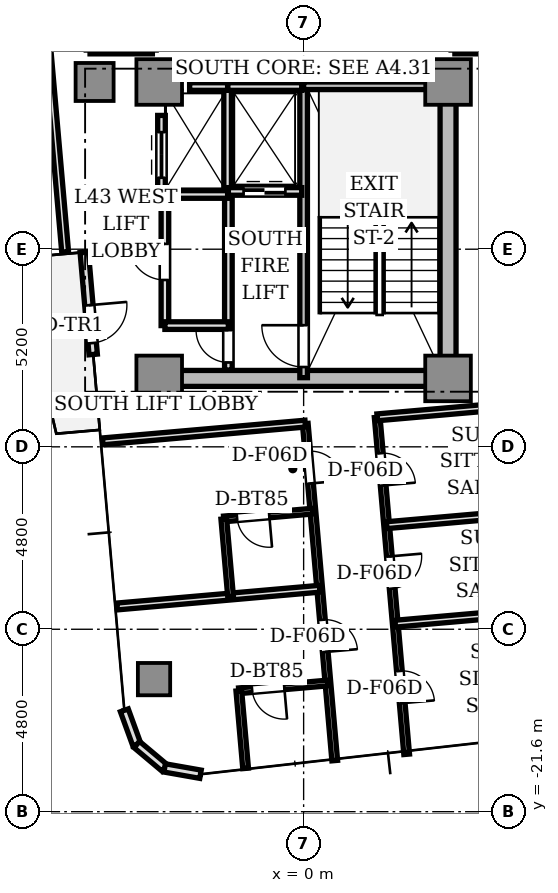
"""IFC4 building model, lengths in metres.
Left out: names, types, materials, properties, quantities, classifications, styles, units other than length and angle.
Written with IfcOpenShell. Run it as: python <this file> out.ifc"""

import sys

from ifc_helpers import new_model, si_unit, direction, frame, frame_2d, origin, origin_2d, place, context, subcontext, project, spatial, rectangle, extrude, source, transform, mapped, element, fill, save


model = new_model("IFC4")
c1 = context("Model", 3, precision=1e-05, world=origin(), true_north=direction((0.0, 1.0)))
c2 = subcontext(c1, "Body", "Model", "MODEL_VIEW")
j1 = project(units=[si_unit("LENGTHUNIT", "METRE"), si_unit("PLANEANGLEUNIT", "RADIAN")], contexts=[c1])
p1 = place(None, origin())
s1 = spatial("IfcSite", under=j1, at=p1, CompositionType="ELEMENT")
p2 = place(p1, origin())
s2 = spatial("IfcBuilding", under=s1, at=p2, CompositionType="ELEMENT")
p3 = place(p2, frame((0.0, 0.0, 157.3)))
s3 = spatial("IfcBuildingStorey", under=s2, at=p3, CompositionType="ELEMENT", Elevation=157.3)
p4 = place(p3, frame((-3.55, -10.2, 0.0), z_axis=(0.0, 0.0, 1.0), x_axis=(1.0, 0.0, 0.0)))
e1 = element("IfcWall", 1, at=p4, inside=s3, PredefinedType="SHEAR", context=c2, shape_type="SweptSolid", body=[
    extrude(rectangle(XDim=7.1, YDim=0.42, at=frame_2d((3.55, 0.0))), origin(), (0.0, 0.0, 1.0), 3.11),
])
p5 = place(p3, frame((3.8, -9.75, 0.0), z_axis=(0.0, 0.0, 1.0), x_axis=(0.0, 1.0, 0.0)))
e2 = element("IfcWall", 2, at=p5, inside=s3, PredefinedType="SHEAR", context=c2, shape_type="SweptSolid", body=[
    extrude(rectangle(XDim=6.9, YDim=0.42, at=frame_2d((3.45, 0.0))), origin(), (0.0, 0.0, 1.0), 3.11),
])
m1 = source(origin(), c2, "Body", "SweptSolid", [
    extrude(rectangle(XDim=1.2, YDim=1.2, at=origin_2d()), origin(), (0.0, 0.0, 1.0), 3.11),
])
for number, where, z_axis, x_axis in (
    (3, (-3.8, -2.4, 0.0), (0.0, 0.0, 1.0), (1.0, 0.0, 0.0)),
    (4, (3.8, -2.4, 0.0), (0.0, 0.0, 1.0), (1.0, 0.0, 0.0)),
    (5, (-3.8, -10.2, 0.0), (0.0, 0.0, 1.0), (1.0, 0.0, 0.0)),
    (6, (3.8, -10.2, 0.0), (0.0, 0.0, 1.0), (1.0, 0.0, 0.0)),
):
    element("IfcColumn", number, at=place(p3, frame(where, z_axis=z_axis, x_axis=x_axis)), inside=s3, PredefinedType="COLUMN", context=c2, shape_type="MappedRepresentation", body=[
        mapped(m1, transform((0.0, 0.0, 0.0), scale=1.0)),
    ])
m2 = source(origin(), c2, "Body", "SweptSolid", [
    extrude(rectangle(XDim=1.0, YDim=1.0, at=origin_2d()), origin(), (0.0, 0.0, 1.0), 3.11),
])
p6 = place(p3, frame((-5.5, -2.4, 0.0), z_axis=(0.0, 0.0, 1.0), x_axis=(1.0, 0.0, 0.0)))
e7 = element("IfcColumn", 7, at=p6, inside=s3, PredefinedType="COLUMN", context=c2, shape_type="MappedRepresentation", body=[
    mapped(m2, transform((0.0, 0.0, 0.0), scale=1.0)),
])
m3 = source(origin(), c2, "Body", "SweptSolid", [
    extrude(rectangle(XDim=0.85, YDim=0.85, at=origin_2d()), origin(), (0.0, 0.0, 1.0), 3.11),
])
p7 = place(p3, frame((-3.936, -18.112, 0.0), z_axis=(0.0, 0.0, 1.0), x_axis=(1.0, 0.0, 0.0)))
e8 = element("IfcColumn", 8, at=p7, inside=s3, PredefinedType="COLUMN", context=c2, shape_type="MappedRepresentation", body=[
    mapped(m3, transform((0.0, 0.0, 0.0), scale=1.0)),
])
p8 = place(p3, frame((-5.772, -6.879, 0.0), z_axis=(0.0, 0.0, 1.0), x_axis=(0.087168071984, -0.996193619346, 0.0)))
e9 = element("IfcWall", 9, at=p8, inside=s3, PredefinedType="STANDARD", context=c2, shape_type="SweptSolid", body=[
    extrude(rectangle(XDim=2.7, YDim=0.22, at=frame_2d((1.35, 0.0))), origin(), (0.0, 0.0, 1.0), 3.11),
])
p9 = place(p8, frame((1.4, 0.0, 0.0)))
e10 = element("IfcOpeningElement", 10, at=p9, cuts=e9, PredefinedType="OPENING", context=c2, shape_type="SweptSolid", body=[
    extrude(rectangle(XDim=1.0, YDim=2.2, at=frame_2d((0.5, 1.1))), frame((0.0, 0.12, 0.0), z_axis=(0.0, -1.0, 0.0), x_axis=(1.0, 0.0, 0.0)), (0.0, 0.0, 1.0), 0.24),
])
p10 = place(p3, frame((-4.718, -18.933, 0.0), z_axis=(0.0, 0.0, 1.0), x_axis=(0.34188635151, -0.939741306239, 0.0)))
e11 = element("IfcWall", 11, at=p10, inside=s3, PredefinedType="STANDARD", context=c2, shape_type="SweptSolid", body=[
    extrude(rectangle(XDim=0.958, YDim=0.22, at=frame_2d((0.479, 0.0))), origin(), (0.0, 0.0, 1.0), 3.11),
])
for number, where, z_axis, x_axis in (
    (12, (-4.39, -19.833, 0.0), (0.0, 0.0, 1.0), (0.766, -0.643, 0.0)),
    (13, (-3.657, -20.449, 0.0), (0.0, 0.0, 1.0), (0.985, -0.174, 0.0)),
):
    element("IfcWall", number, at=place(p3, frame(where, z_axis=z_axis, x_axis=x_axis)), inside=s3, PredefinedType="STANDARD", context=c2, shape_type="SweptSolid", body=[
        extrude(rectangle(XDim=0.958, YDim=0.22, at=frame_2d((0.479, 0.0))), origin(), (0.0, 0.0, 1.0), 3.11),
    ])
p11 = place(p3, frame((0.0, -10.18, 0.0), z_axis=(0.0, 0.0, 1.0), x_axis=(0.0, 1.0, 0.0)))
e14 = element("IfcWall", 14, at=p11, inside=s3, PredefinedType="SOLIDWALL", context=c2, shape_type="SweptSolid", body=[
    extrude(rectangle(XDim=7.68, YDim=0.2, at=frame_2d((3.84, 0.0))), origin(), (0.0, 0.0, 1.0), 3.11),
])
p12 = place(p11, frame((0.28, 0.0, 0.0)))
e15 = element("IfcOpeningElement", 15, at=p12, cuts=e14, PredefinedType="OPENING", context=c2, shape_type="SweptSolid", body=[
    extrude(rectangle(XDim=1.1, YDim=2.15, at=frame_2d((0.55, 1.075))), frame((0.0, 0.11, 0.0), z_axis=(0.0, -1.0, 0.0), x_axis=(1.0, 0.0, 0.0)), (0.0, 0.0, 1.0), 0.22),
])
p13 = place(p3, frame((0.0, -2.5, 0.0), z_axis=(0.0, 0.0, 1.0), x_axis=(1.0, 0.0, 0.0)))
e16 = element("IfcWall", 16, at=p13, inside=s3, PredefinedType="SOLIDWALL", context=c2, shape_type="SweptSolid", body=[
    extrude(rectangle(XDim=3.72, YDim=0.2, at=frame_2d((1.86, 0.0))), origin(), (0.0, 0.0, 1.0), 3.11),
])
p14 = place(p3, frame((-1.98, -9.98, 0.0), z_axis=(0.0, 0.0, 1.0), x_axis=(0.0, 1.0, 0.0)))
e17 = element("IfcWall", 17, at=p14, inside=s3, PredefinedType="SOLIDWALL", context=c2, shape_type="SweptSolid", body=[
    extrude(rectangle(XDim=4.66, YDim=0.2, at=frame_2d((2.33, 0.0))), origin(), (0.0, 0.0, 1.0), 2.66),
])
p15 = place(p14, frame((0.2, 0.0, 0.0)))
e18 = element("IfcOpeningElement", 18, at=p15, cuts=e17, PredefinedType="OPENING", context=c2, shape_type="SweptSolid", body=[
    extrude(rectangle(XDim=0.85, YDim=2.1, at=frame_2d((0.425, 1.05))), frame((0.0, 0.11, 0.0), z_axis=(0.0, -1.0, 0.0), x_axis=(1.0, 0.0, 0.0)), (0.0, 0.0, 1.0), 0.22),
])
p16 = place(p3, frame((-2.0, -5.28, 0.0), z_axis=(0.0, 0.0, 1.0), x_axis=(0.0, 1.0, 0.0)))
e19 = element("IfcWall", 19, at=p16, inside=s3, PredefinedType="SOLIDWALL", context=c2, shape_type="SweptSolid", body=[
    extrude(rectangle(XDim=2.78, YDim=0.2, at=frame_2d((1.39, 0.0))), origin(), (0.0, 0.0, 1.0), 2.66),
])
p17 = place(p3, frame((-2.0, -2.52, 0.0), z_axis=(0.0, 0.0, 1.0), x_axis=(1.0, 0.0, 0.0)))
e20 = element("IfcWall", 20, at=p17, inside=s3, PredefinedType="SOLIDWALL", context=c2, shape_type="SweptSolid", body=[
    extrude(rectangle(XDim=1.95, YDim=0.2, at=frame_2d((0.975, 0.0))), origin(), (0.0, 0.0, 1.0), 2.66),
])
p18 = place(p3, frame((-1.98, -5.28, 0.0), z_axis=(0.0, 0.0, 1.0), x_axis=(1.0, 0.0, 0.0)))
e21 = element("IfcWall", 21, at=p18, inside=s3, PredefinedType="SOLIDWALL", context=c2, shape_type="SweptSolid", body=[
    extrude(rectangle(XDim=1.93, YDim=0.2, at=frame_2d((0.965, 0.0))), origin(), (0.0, 0.0, 1.0), 2.66),
])
p19 = place(p18, frame((0.4, 0.0, 0.0)))
e22 = element("IfcOpeningElement", 22, at=p19, cuts=e21, PredefinedType="OPENING", context=c2, shape_type="SweptSolid", body=[
    extrude(rectangle(XDim=1.1, YDim=2.2, at=frame_2d((0.55, 1.1))), frame((0.0, 0.11, 0.0), z_axis=(0.0, -1.0, 0.0), x_axis=(1.0, 0.0, 0.0)), (0.0, 0.0, 1.0), 0.22),
])
p20 = place(p3, frame((-3.0, -2.52, 0.0), z_axis=(0.0, 0.0, 1.0), x_axis=(1.0, 0.0, 0.0)))
e23 = element("IfcWall", 23, at=p20, inside=s3, PredefinedType="SOLIDWALL", context=c2, shape_type="SweptSolid", body=[
    extrude(rectangle(XDim=1.0, YDim=0.2, at=frame_2d((0.5, 0.0))), origin(), (0.0, 0.0, 1.0), 2.66),
])
p21 = place(p3, frame((-3.74, -5.36, 0.0), z_axis=(0.0, 0.0, 1.0), x_axis=(1.0, 0.0, 0.0)))
e24 = element("IfcWall", 24, at=p21, inside=s3, PredefinedType="SOLIDWALL", context=c2, shape_type="SweptSolid", body=[
    extrude(rectangle(XDim=1.74, YDim=0.2, at=frame_2d((0.87, 0.0))), origin(), (0.0, 0.0, 1.0), 2.66),
])
p22 = place(p3, frame((-3.74, -5.36, 0.0), z_axis=(0.0, 0.0, 1.0), x_axis=(0.0, 1.0, 0.0)))
e25 = element("IfcWall", 25, at=p22, inside=s3, PredefinedType="SOLIDWALL", context=c2, shape_type="SweptSolid", body=[
    extrude(rectangle(XDim=2.08, YDim=0.2, at=frame_2d((1.04, 0.0))), origin(), (0.0, 0.0, 1.0), 2.66),
])
p23 = place(p22, frame((0.44, 0.0, 0.0)))
e26 = element("IfcOpeningElement", 26, at=p23, cuts=e25, PredefinedType="OPENING", context=c2, shape_type="SweptSolid", body=[
    extrude(rectangle(XDim=1.2, YDim=2.2, at=frame_2d((0.6, 1.1))), frame((0.0, 0.11, 0.0), z_axis=(0.0, -1.0, 0.0), x_axis=(1.0, 0.0, 0.0)), (0.0, 0.0, 1.0), 0.22),
])
for number, where, z_axis, x_axis in (
    (27, (3.98, -1.56, 0.0), (0.0, 0.0, 1.0), (1.0, 0.0, 0.0)),
    (28, (-5.62, -1.56, 0.0), (0.0, 0.0, 1.0), (1.0, 0.0, 0.0)),
):
    element("IfcWall", number, at=place(p3, frame(where, z_axis=z_axis, x_axis=x_axis)), inside=s3, PredefinedType="SOLIDWALL", context=c2, shape_type="SweptSolid", body=[
        extrude(rectangle(XDim=1.64, YDim=0.2, at=frame_2d((0.82, 0.0))), origin(), (0.0, 0.0, 1.0), 2.66),
    ])
p24 = place(p3, frame((-3.65, -8.81, 0.0), z_axis=(0.0, 0.0, 1.0), x_axis=(0.0, 1.0, 0.0)))
e29 = element("IfcWall", 29, at=p24, inside=s3, PredefinedType="SOLIDWALL", context=c2, shape_type="SweptSolid", body=[
    extrude(rectangle(XDim=3.43, YDim=0.2, at=frame_2d((1.715, 0.0))), origin(), (0.0, 0.0, 1.0), 2.66),
])
p25 = place(p24, frame((1.2, 0.0, 0.0)))
e30 = element("IfcOpeningElement", 30, at=p25, cuts=e29, PredefinedType="OPENING", context=c2, shape_type="SweptSolid", body=[
    extrude(rectangle(XDim=0.95, YDim=2.15, at=frame_2d((0.475, 1.075))), frame((0.0, 0.11, 0.0), z_axis=(0.0, -1.0, 0.0), x_axis=(1.0, 0.0, 0.0)), (0.0, 0.0, 1.0), 0.22),
])
p26 = place(p3, frame((-3.65, -8.81, 0.0), z_axis=(0.0, 0.0, 1.0), x_axis=(1.0, 0.0, 0.0)))
e31 = element("IfcWall", 31, at=p26, inside=s3, PredefinedType="SOLIDWALL", context=c2, shape_type="SweptSolid", body=[
    extrude(rectangle(XDim=1.67, YDim=0.2, at=frame_2d((0.835, 0.0))), origin(), (0.0, 0.0, 1.0), 2.66),
])
p27 = place(p3, frame((-6.741, -1.543, 0.0), z_axis=(0.0, 0.0, 1.0), x_axis=(0.087161289348, -0.996194212812, 0.0)))
e32 = element("IfcWall", 32, at=p27, inside=s3, PredefinedType="PARTITIONING", context=c2, shape_type="SweptSolid", body=[
    extrude(rectangle(XDim=5.35, YDim=0.18, at=frame_2d((2.675, 0.0))), origin(), (0.0, 0.0, 1.0), 2.66),
])
p28 = place(p3, frame((1.936, -11.224, 0.0), z_axis=(0.0, 0.0, 1.0), x_axis=(0.087151636982, -0.996195057291, 0.0)))
e33 = element("IfcWall", 33, at=p28, inside=s3, PredefinedType="PARTITIONING", context=c2, shape_type="SweptSolid", body=[
    extrude(rectangle(XDim=8.9, YDim=0.15, at=frame_2d((4.45, 0.0))), origin(), (0.0, 0.0, 1.0), 2.66),
])
p29 = place(p28, frame((0.949, 0.0, 0.0)))
e34 = element("IfcOpeningElement", 34, at=p29, cuts=e33, PredefinedType="OPENING", context=c2, shape_type="SweptSolid", body=[
    extrude(rectangle(XDim=0.85, YDim=2.1, at=frame_2d((0.425, 1.05))), frame((0.0, 0.085, 0.0), z_axis=(0.0, -1.0, 0.0), x_axis=(1.0, 0.0, 0.0)), (0.0, 0.0, 1.0), 0.17),
])
p30 = place(p28, frame((3.674, 0.0, 0.0)))
e35 = element("IfcOpeningElement", 35, at=p30, cuts=e33, PredefinedType="OPENING", context=c2, shape_type="SweptSolid", body=[
    extrude(rectangle(XDim=0.85, YDim=2.1, at=frame_2d((0.425, 1.05))), frame((0.0, 0.085, 0.0), z_axis=(0.0, -1.0, 0.0), x_axis=(1.0, 0.0, 0.0)), (0.0, 0.0, 1.0), 0.17),
])
p31 = place(p28, frame((6.7, 0.0, 0.0)))
e36 = element("IfcOpeningElement", 36, at=p31, cuts=e33, PredefinedType="OPENING", context=c2, shape_type="SweptSolid", body=[
    extrude(rectangle(XDim=0.85, YDim=2.1, at=frame_2d((0.425, 1.05))), frame((0.0, 0.085, 0.0), z_axis=(0.0, -1.0, 0.0), x_axis=(1.0, 0.0, 0.0)), (0.0, 0.0, 1.0), 0.17),
])
p32 = place(p3, frame((0.043, -11.39, 0.0), z_axis=(0.0, 0.0, 1.0), x_axis=(0.087178860582, -0.996192675273, 0.0)))
e37 = element("IfcWall", 37, at=p32, inside=s3, PredefinedType="PARTITIONING", context=c2, shape_type="SweptSolid", body=[
    extrude(rectangle(XDim=8.9, YDim=0.15, at=frame_2d((4.45, 0.0))), origin(), (0.0, 0.0, 1.0), 2.66),
])
p33 = place(p32, frame((0.73, 0.0, 0.0)))
e38 = element("IfcOpeningElement", 38, at=p33, cuts=e37, PredefinedType="OPENING", context=c2, shape_type="SweptSolid", body=[
    extrude(rectangle(XDim=0.85, YDim=2.1, at=frame_2d((0.425, 1.05))), frame((0.0, 0.085, 0.0), z_axis=(0.0, -1.0, 0.0), x_axis=(1.0, 0.0, 0.0)), (0.0, 0.0, 1.0), 0.17),
])
p34 = place(p32, frame((5.181, 0.0, 0.0)))
e39 = element("IfcOpeningElement", 39, at=p34, cuts=e37, PredefinedType="OPENING", context=c2, shape_type="SweptSolid", body=[
    extrude(rectangle(XDim=0.85, YDim=2.1, at=frame_2d((0.425, 1.05))), frame((0.0, 0.085, 0.0), z_axis=(0.0, -1.0, 0.0), x_axis=(1.0, 0.0, 0.0)), (0.0, 0.0, 1.0), 0.17),
])
for number, where, z_axis, x_axis in (
    (40, (1.936, -11.224, 0.0), (0.0, 0.0, 1.0), (0.996, 0.087, 0.0)),
    (41, (-5.287, -11.856, 0.0), (0.0, 0.0, 1.0), (0.996, 0.087, 0.0)),
    (42, (2.184, -14.061, 0.0), (0.0, 0.0, 1.0), (0.996, 0.087, 0.0)),
    (43, (2.411, -16.653, 0.0), (0.0, 0.0, 1.0), (0.996, 0.087, 0.0)),
    (44, (0.423, -15.734, 0.0), (0.0, 0.0, 1.0), (-0.996, -0.087, 0.0)),
):
    element("IfcWall", number, at=place(p3, frame(where, z_axis=z_axis, x_axis=x_axis)), inside=s3, PredefinedType="PARTITIONING", context=c2, shape_type="SweptSolid", body=[
        extrude(rectangle(XDim=5.35, YDim=0.18, at=frame_2d((2.675, 0.0))), origin(), (0.0, 0.0, 1.0), 2.66),
    ])
p35 = place(p3, frame((0.244, -13.692, 0.0), z_axis=(0.0, 0.0, 1.0), x_axis=(-0.996197656711, -0.087121918963, 0.0)))
e45 = element("IfcWall", 45, at=p35, inside=s3, PredefinedType="PARTITIONING", context=c2, shape_type="SweptSolid", body=[
    extrude(rectangle(XDim=2.354, YDim=0.15, at=frame_2d((1.177, 0.0))), origin(), (0.0, 0.0, 1.0), 2.66),
])
p36 = place(p35, frame((1.154, 0.0, 0.0)))
e46 = element("IfcOpeningElement", 46, at=p36, cuts=e45, PredefinedType="OPENING", context=c2, shape_type="SweptSolid", body=[
    extrude(rectangle(XDim=0.85, YDim=2.1, at=frame_2d((0.425, 1.05))), frame((0.0, 0.085, 0.0), z_axis=(0.0, -1.0, 0.0), x_axis=(1.0, 0.0, 0.0)), (0.0, 0.0, 1.0), 0.17),
])
p37 = place(p3, frame((-2.101, -13.897, 0.0), z_axis=(0.0, 0.0, 1.0), x_axis=(0.087174336889, -0.99619307114, 0.0)))
e47 = element("IfcWall", 47, at=p37, inside=s3, PredefinedType="PARTITIONING", context=c2, shape_type="SweptSolid", body=[
    extrude(rectangle(XDim=2.05, YDim=0.15, at=frame_2d((1.025, 0.0))), origin(), (0.0, 0.0, 1.0), 2.66),
])
p38 = place(p3, frame((0.64, -18.213, 0.0), z_axis=(0.0, 0.0, 1.0), x_axis=(-0.996188649846, -0.087224846905, 0.0)))
e48 = element("IfcWall", 48, at=p38, inside=s3, PredefinedType="PARTITIONING", context=c2, shape_type="SweptSolid", body=[
    extrude(rectangle(XDim=2.354, YDim=0.15, at=frame_2d((1.177, 0.0))), origin(), (0.0, 0.0, 1.0), 2.66),
])
p39 = place(p38, frame((1.154, 0.0, 0.0)))
e49 = element("IfcOpeningElement", 49, at=p39, cuts=e48, PredefinedType="OPENING", context=c2, shape_type="SweptSolid", body=[
    extrude(rectangle(XDim=0.85, YDim=2.1, at=frame_2d((0.425, 1.05))), frame((0.0, 0.085, 0.0), z_axis=(0.0, -1.0, 0.0), x_axis=(1.0, 0.0, 0.0)), (0.0, 0.0, 1.0), 0.17),
])
p40 = place(p3, frame((-1.705, -18.419, 0.0), z_axis=(0.0, 0.0, 1.0), x_axis=(0.087056149438, -0.996203406361, 0.0)))
e50 = element("IfcWall", 50, at=p40, inside=s3, PredefinedType="PARTITIONING", context=c2, shape_type="SweptSolid", body=[
    extrude(rectangle(XDim=2.05, YDim=0.15, at=frame_2d((1.025, 0.0))), origin(), (0.0, 0.0, 1.0), 2.66),
])
m4 = source(origin(), c2, "Body", "SweptSolid", [
    extrude(rectangle(XDim=1.0, YDim=0.05, at=origin_2d()), origin(), (0.0, 0.0, 1.0), 2.2),
])
p41 = place(p9, frame((0.5, 0.0, 0.0)))
e51 = element("IfcDoor", 51, at=p41, inside=s3, OperationType="SINGLE_SWING_LEFT", PredefinedType="DOOR", context=c2, shape_type="MappedRepresentation", body=[
    mapped(m4, transform((0.0, 0.0, 0.0), scale=1.0)),
])
fill(e10, e51)
m5 = source(origin(), c2, "Body", "SweptSolid", [
    extrude(rectangle(XDim=1.1, YDim=0.05, at=origin_2d()), origin(), (0.0, 0.0, 1.0), 2.15),
])
p42 = place(p12, frame((0.55, 0.0, 0.0)))
e52 = element("IfcDoor", 52, at=p42, inside=s3, OperationType="SINGLE_SWING_RIGHT", PredefinedType="DOOR", context=c2, shape_type="MappedRepresentation", body=[
    mapped(m5, transform((0.0, 0.0, 0.0), scale=1.0)),
])
fill(e15, e52)
m6 = source(origin(), c2, "Body", "SweptSolid", [
    extrude(rectangle(XDim=0.85, YDim=0.05, at=origin_2d()), origin(), (0.0, 0.0, 1.0), 2.1),
])
p43 = place(p15, frame((0.425, 0.0, 0.0)))
e53 = element("IfcDoor", 53, at=p43, inside=s3, OperationType="SINGLE_SWING_RIGHT", PredefinedType="DOOR", context=c2, shape_type="MappedRepresentation", body=[
    mapped(m6, transform((0.0, 0.0, 0.0), scale=1.0)),
])
fill(e18, e53)
m7 = source(origin(), c2, "Body", "SweptSolid", [
    extrude(rectangle(XDim=1.1, YDim=0.05, at=origin_2d()), origin(), (0.0, 0.0, 1.0), 2.2),
])
p44 = place(p19, frame((0.55, 0.0, 0.0)))
e54 = element("IfcDoor", 54, at=p44, inside=s3, OperationType="DOUBLE_DOOR_SLIDING", PredefinedType="DOOR", context=c2, shape_type="MappedRepresentation", body=[
    mapped(m7, transform((0.0, 0.0, 0.0), scale=1.0)),
])
fill(e22, e54)
m8 = source(origin(), c2, "Body", "SweptSolid", [
    extrude(rectangle(XDim=1.2, YDim=0.05, at=origin_2d()), origin(), (0.0, 0.0, 1.0), 2.2),
])
p45 = place(p23, frame((0.6, 0.0, 0.0)))
e55 = element("IfcDoor", 55, at=p45, inside=s3, OperationType="DOUBLE_DOOR_SLIDING", PredefinedType="DOOR", context=c2, shape_type="MappedRepresentation", body=[
    mapped(m8, transform((0.0, 0.0, 0.0), scale=1.0)),
])
fill(e26, e55)
m9 = source(origin(), c2, "Body", "SweptSolid", [
    extrude(rectangle(XDim=0.95, YDim=0.05, at=origin_2d()), origin(), (0.0, 0.0, 1.0), 2.15),
])
p46 = place(p25, frame((0.475, 0.0, 0.0)))
e56 = element("IfcDoor", 56, at=p46, inside=s3, OperationType="SINGLE_SWING_RIGHT", PredefinedType="DOOR", context=c2, shape_type="MappedRepresentation", body=[
    mapped(m9, transform((0.0, 0.0, 0.0), scale=1.0)),
])
fill(e30, e56)
p47 = place(p29, frame((0.425, 0.0, 0.0)))
e57 = element("IfcDoor", 57, at=p47, inside=s3, OperationType="SINGLE_SWING_RIGHT", PredefinedType="DOOR", context=c2, shape_type="MappedRepresentation", body=[
    mapped(m6, transform((0.0, 0.0, 0.0), scale=1.0)),
])
fill(e34, e57)
p48 = place(p30, frame((0.425, 0.0, 0.0)))
e58 = element("IfcDoor", 58, at=p48, inside=s3, OperationType="SINGLE_SWING_LEFT", PredefinedType="DOOR", context=c2, shape_type="MappedRepresentation", body=[
    mapped(m6, transform((0.0, 0.0, 0.0), scale=1.0)),
])
fill(e35, e58)
p49 = place(p31, frame((0.425, 0.0, 0.0)))
e59 = element("IfcDoor", 59, at=p49, inside=s3, OperationType="SINGLE_SWING_RIGHT", PredefinedType="DOOR", context=c2, shape_type="MappedRepresentation", body=[
    mapped(m6, transform((0.0, 0.0, 0.0), scale=1.0)),
])
fill(e36, e59)
p50 = place(p36, frame((0.425, 0.0, 0.0)))
e60 = element("IfcDoor", 60, at=p50, inside=s3, OperationType="SINGLE_SWING_LEFT", PredefinedType="DOOR", context=c2, shape_type="MappedRepresentation", body=[
    mapped(m6, transform((0.0, 0.0, 0.0), scale=1.0)),
])
fill(e46, e60)
p51 = place(p33, frame((0.425, 0.0, 0.0)))
e61 = element("IfcDoor", 61, at=p51, inside=s3, OperationType="SINGLE_SWING_RIGHT", PredefinedType="DOOR", context=c2, shape_type="MappedRepresentation", body=[
    mapped(m6, transform((0.0, 0.0, 0.0), scale=1.0)),
])
fill(e38, e61)
p52 = place(p39, frame((0.425, 0.0, 0.0)))
e62 = element("IfcDoor", 62, at=p52, inside=s3, OperationType="SINGLE_SWING_LEFT", PredefinedType="DOOR", context=c2, shape_type="MappedRepresentation", body=[
    mapped(m6, transform((0.0, 0.0, 0.0), scale=1.0)),
])
fill(e49, e62)
p53 = place(p34, frame((0.425, 0.0, 0.0)))
e63 = element("IfcDoor", 63, at=p53, inside=s3, OperationType="SINGLE_SWING_RIGHT", PredefinedType="DOOR", context=c2, shape_type="MappedRepresentation", body=[
    mapped(m6, transform((0.0, 0.0, 0.0), scale=1.0)),
])
fill(e39, e63)
save(model, sys.argv[1])
